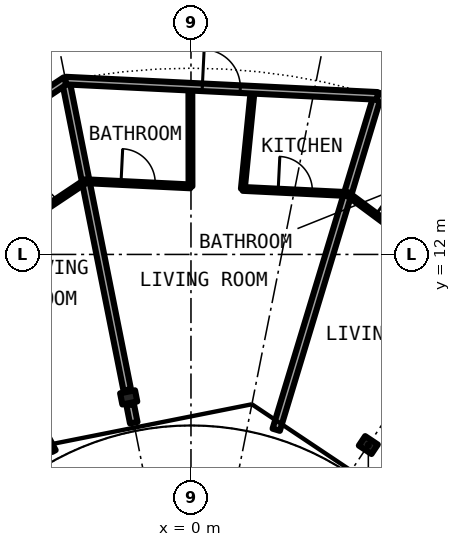
"""IFC4 building model, lengths in metres.
Left out: names, types, materials, properties, quantities, classifications, styles, units other than length and angle.
Written with IfcOpenShell. Run it as: python <this file> out.ifc"""

import sys

from ifc_helpers import new_model, si_unit, direction, frame, frame_2d, origin, origin_2d, place, context, subcontext, project, spatial, rectangle, i_section, extrude, element, fill, save


model = new_model("IFC4")
c1 = context("Model", 3, precision=1e-05, world=origin(), true_north=direction((0.0, 1.0)))
c2 = subcontext(c1, "Body", "Model", "MODEL_VIEW")
j1 = project(units=[si_unit("LENGTHUNIT", "METRE"), si_unit("PLANEANGLEUNIT", "RADIAN")], contexts=[c1])
p1 = place(None, origin())
s1 = spatial("IfcSite", under=j1, at=p1, CompositionType="ELEMENT")
p2 = place(p1, origin())
s2 = spatial("IfcBuilding", under=s1, at=p2, CompositionType="ELEMENT")
p3 = place(p2, frame((0.0, 0.0, 91.05)))
s3 = spatial("IfcBuildingStorey", under=s2, at=p3, CompositionType="ELEMENT", Elevation=91.05)
for number, where, z_axis, x_axis in (
    (1, (4.667, 6.984, 0.0), (0.0, 0.0, 1.0), (0.556, 0.831, 0.0)),
    (2, (-1.639, 8.239, 0.0), (0.0, 0.0, 1.0), (-0.195, 0.981, 0.0)),
):
    element("IfcColumn", number, at=place(p3, frame(where, z_axis=z_axis, x_axis=x_axis)), inside=s3, PredefinedType="COLUMN", context=c2, shape_type="SweptSolid", body=[
        extrude(i_section(OverallWidth=0.3, OverallDepth=0.4, WebThickness=0.013, FlangeThickness=0.024, FilletRadius=0.027, at=origin_2d()), origin(), (0.0, 0.0, 1.0), 3.05),
    ])
p4 = place(p3, frame((-6.159, 11.663, 0.0), z_axis=(0.0, 0.0, 1.0), x_axis=(0.466976820365, -0.884269556889, 0.0)))
e3 = element("IfcWall", 3, at=p4, inside=s3, PredefinedType="PARTITIONING", context=c2, shape_type="SweptSolid", body=[
    extrude(rectangle(XDim=5.469, YDim=0.1, at=frame_2d((2.735, 0.0))), origin(), (0.0, 0.0, 1.0), 2.7),
])
p5 = place(p4, frame((2.284, 0.0, 0.0)))
e4 = element("IfcOpeningElement", 4, at=p5, cuts=e3, PredefinedType="OPENING", context=c2, shape_type="SweptSolid", body=[
    extrude(rectangle(XDim=0.9, YDim=2.3, at=frame_2d((0.45, 1.15))), frame((0.0, 0.06, 0.0), z_axis=(0.0, -1.0, 0.0), x_axis=(1.0, 0.0, 0.0)), (0.0, 0.0, 1.0), 0.12),
])
p6 = place(p3, frame((-3.297, 16.575, 0.0), z_axis=(0.0, 0.0, 1.0), x_axis=(0.195205282633, -0.980762406311, 0.0)))
e5 = element("IfcWall", 5, at=p6, inside=s3, PredefinedType="PARTITIONING", context=c2, shape_type="SweptSolid", body=[
    extrude(rectangle(XDim=8.3, YDim=0.2, at=frame_2d((4.15, 0.0))), origin(), (0.0, 0.0, 1.0), 2.7),
])
p7 = place(p3, frame((-1.599, 8.043, 0.0), z_axis=(0.0, 0.0, 1.0), x_axis=(0.193768289311, -0.981047323047, 0.0)))
e6 = element("IfcWall", 6, at=p7, inside=s3, PredefinedType="PARTITIONING", context=c2, shape_type="SweptSolid", body=[
    extrude(rectangle(XDim=0.48, YDim=0.2, at=frame_2d((0.24, 0.0))), origin(), (0.0, 0.0, 1.0), 2.7),
])
p8 = place(p3, frame((-0.013, 13.792, 0.0), z_axis=(0.0, 0.0, 1.0), x_axis=(-0.001210427419, 0.999999267432, 0.0)))
e7 = element("IfcWall", 7, at=p8, inside=s3, PredefinedType="PARTITIONING", context=c2, shape_type="SweptSolid", body=[
    extrude(rectangle(XDim=2.622, YDim=0.1, at=frame_2d((1.311, 0.0))), origin(), (0.0, 0.0, 1.0), 2.7),
])
p9 = place(p3, frame((1.365, 13.724, 0.0), z_axis=(0.0, 0.0, 1.0), x_axis=(0.099171803948, 0.995070325807, 0.0)))
e8 = element("IfcWall", 8, at=p9, inside=s3, PredefinedType="PARTITIONING", context=c2, shape_type="SweptSolid", body=[
    extrude(rectangle(XDim=2.622, YDim=0.1, at=frame_2d((1.311, 0.0))), origin(), (0.0, 0.0, 1.0), 2.7),
])
p10 = place(p3, frame((2.243, 7.387, 0.0), z_axis=(0.0, 0.0, 1.0), x_axis=(0.290196345171, 0.956967126525, 0.0)))
e9 = element("IfcWall", 9, at=p10, inside=s3, PredefinedType="PARTITIONING", context=c2, shape_type="SweptSolid", body=[
    extrude(rectangle(XDim=9.18, YDim=0.2, at=frame_2d((4.59, 0.0))), origin(), (0.0, 0.0, 1.0), 2.7),
])
p11 = place(p3, frame((4.909, 5.958, 0.0), z_axis=(0.0, 0.0, 1.0), x_axis=(0.635976043025, 0.771708800454, 0.0)))
e10 = element("IfcWall", 10, at=p11, inside=s3, PredefinedType="PARTITIONING", context=c2, shape_type="SweptSolid", body=[
    extrude(rectangle(XDim=8.213, YDim=0.1, at=frame_2d((4.106, 0.0))), origin(), (0.0, 0.0, 1.0), 2.7),
])
p12 = place(p11, frame((6.49, 0.0, 0.0)))
e11 = element("IfcOpeningElement", 11, at=p12, cuts=e10, PredefinedType="OPENING", context=c2, shape_type="SweptSolid", body=[
    extrude(rectangle(XDim=0.9, YDim=2.3, at=frame_2d((0.45, 1.15))), frame((0.0, 0.06, 0.0), z_axis=(0.0, -1.0, 0.0), x_axis=(1.0, 0.0, 0.0)), (0.0, 0.0, 1.0), 0.12),
])
p13 = place(p11, frame((2.384, 0.0, 0.0)))
e12 = element("IfcOpeningElement", 12, at=p13, cuts=e10, PredefinedType="OPENING", context=c2, shape_type="SweptSolid", body=[
    extrude(rectangle(XDim=0.9, YDim=2.3, at=frame_2d((0.45, 1.15))), frame((0.0, 0.06, 0.0), z_axis=(0.0, -1.0, 0.0), x_axis=(1.0, 0.0, 0.0)), (0.0, 0.0, 1.0), 0.12),
])
p14 = place(p3, frame((-5.032, 12.417, 0.0), z_axis=(0.0, 0.0, 1.0), x_axis=(0.831538390496, 0.555467285384, 0.0)))
e13 = element("IfcWall", 13, at=p14, inside=s3, PredefinedType="PARTITIONING", context=c2, shape_type="SweptSolid", body=[
    extrude(rectangle(XDim=2.717, YDim=0.1, at=frame_2d((1.358, 0.0))), origin(), (0.0, 0.0, 1.0), 2.7),
])
p15 = place(p14, frame((0.911, 0.0, 0.0)))
e14 = element("IfcOpeningElement", 14, at=p15, cuts=e13, PredefinedType="OPENING", context=c2, shape_type="SweptSolid", body=[
    extrude(rectangle(XDim=0.9, YDim=2.3, at=frame_2d((0.45, 1.15))), frame((0.0, 0.06, 0.0), z_axis=(0.0, -1.0, 0.0), x_axis=(1.0, 0.0, 0.0)), (0.0, 0.0, 1.0), 0.12),
])
p16 = place(p3, frame((4.122, 13.589, 0.0), z_axis=(0.0, 0.0, 1.0), x_axis=(0.803128348509, -0.595806055542, 0.0)))
e15 = element("IfcWall", 15, at=p16, inside=s3, PredefinedType="PARTITIONING", context=c2, shape_type="SweptSolid", body=[
    extrude(rectangle(XDim=2.734, YDim=0.1, at=frame_2d((1.367, 0.0))), origin(), (0.0, 0.0, 1.0), 2.7),
])
p17 = place(p16, frame((0.917, 0.0, 0.0)))
e16 = element("IfcOpeningElement", 16, at=p17, cuts=e15, PredefinedType="OPENING", context=c2, shape_type="SweptSolid", body=[
    extrude(rectangle(XDim=0.9, YDim=2.3, at=frame_2d((0.45, 1.15))), frame((0.0, 0.06, 0.0), z_axis=(0.0, -1.0, 0.0), x_axis=(1.0, 0.0, 0.0)), (0.0, 0.0, 1.0), 0.12),
])
p18 = place(p3, frame((-2.77, 13.926, 0.0), z_axis=(0.0, 0.0, 1.0), x_axis=(0.99880320044, -0.048909782152, 0.0)))
e17 = element("IfcWall", 17, at=p18, inside=s3, PredefinedType="PARTITIONING", context=c2, shape_type="SweptSolid", body=[
    extrude(rectangle(XDim=2.76, YDim=0.1, at=frame_2d((1.38, 0.0))), origin(), (0.0, 0.0, 1.0), 2.7),
])
p19 = place(p18, frame((0.93, 0.0, 0.0)))
e18 = element("IfcOpeningElement", 18, at=p19, cuts=e17, PredefinedType="OPENING", context=c2, shape_type="SweptSolid", body=[
    extrude(rectangle(XDim=0.9, YDim=2.3, at=frame_2d((0.45, 1.15))), frame((0.0, 0.06, 0.0), z_axis=(0.0, -1.0, 0.0), x_axis=(1.0, 0.0, 0.0)), (0.0, 0.0, 1.0), 0.12),
])
p20 = place(p3, frame((1.365, 13.724, 0.0), z_axis=(0.0, 0.0, 1.0), x_axis=(0.99880320044, -0.048909782152, 0.0)))
e19 = element("IfcWall", 19, at=p20, inside=s3, PredefinedType="PARTITIONING", context=c2, shape_type="SweptSolid", body=[
    extrude(rectangle(XDim=2.76, YDim=0.1, at=frame_2d((1.38, 0.0))), origin(), (0.0, 0.0, 1.0), 2.7),
])
p21 = place(p20, frame((0.93, 0.0, 0.0)))
e20 = element("IfcOpeningElement", 20, at=p21, cuts=e19, PredefinedType="OPENING", context=c2, shape_type="SweptSolid", body=[
    extrude(rectangle(XDim=0.9, YDim=2.3, at=frame_2d((0.45, 1.15))), frame((0.0, 0.06, 0.0), z_axis=(0.0, -1.0, 0.0), x_axis=(1.0, 0.0, 0.0)), (0.0, 0.0, 1.0), 0.12),
])
p22 = place(p3, frame((-12.708, 10.286, 0.0), z_axis=(0.0, 0.0, 1.0), x_axis=(0.831405725802, 0.555665834026, 0.0)))
e21 = element("IfcWall", 21, at=p22, inside=s3, PredefinedType="PARTITIONING", context=c2, shape_type="SweptSolid", body=[
    extrude(rectangle(XDim=11.314, YDim=0.2, at=frame_2d((5.657, 0.0))), origin(), (0.0, 0.0, 1.0), 2.7),
])
p23 = place(p22, frame((5.969, 0.0, 0.0)))
e22 = element("IfcOpeningElement", 22, at=p23, cuts=e21, PredefinedType="OPENING", context=c2, shape_type="SweptSolid", body=[
    extrude(rectangle(XDim=1.0, YDim=2.3, at=frame_2d((0.5, 1.15))), frame((0.0, 0.11, 0.0), z_axis=(0.0, -1.0, 0.0), x_axis=(1.0, 0.0, 0.0)), (0.0, 0.0, 1.0), 0.22),
])
p24 = place(p3, frame((4.906, 16.172, 0.0), z_axis=(0.0, 0.0, 1.0), x_axis=(0.803191461888, -0.595720971219, 0.0)))
e23 = element("IfcWall", 23, at=p24, inside=s3, PredefinedType="PARTITIONING", context=c2, shape_type="SweptSolid", body=[
    extrude(rectangle(XDim=9.76, YDim=0.2, at=frame_2d((4.88, 0.0))), origin(), (0.0, 0.0, 1.0), 2.7),
])
p25 = place(p24, frame((4.38, 0.0, 0.0)))
e24 = element("IfcOpeningElement", 24, at=p25, cuts=e23, PredefinedType="OPENING", context=c2, shape_type="SweptSolid", body=[
    extrude(rectangle(XDim=1.0, YDim=2.3, at=frame_2d((0.5, 1.15))), frame((0.0, 0.11, 0.0), z_axis=(0.0, -1.0, 0.0), x_axis=(1.0, 0.0, 0.0)), (0.0, 0.0, 1.0), 0.22),
])
p26 = place(p3, frame((-3.298, 16.574, 0.0), z_axis=(0.0, 0.0, 1.0), x_axis=(0.998802523271, -0.048923608895, 0.0)))
e25 = element("IfcWall", 25, at=p26, inside=s3, PredefinedType="PARTITIONING", context=c2, shape_type="SweptSolid", body=[
    extrude(rectangle(XDim=8.214, YDim=0.2, at=frame_2d((4.107, 0.0))), origin(), (0.0, 0.0, 1.0), 2.7),
])
p27 = place(p26, frame((3.6, 0.0, 0.0)))
e26 = element("IfcOpeningElement", 26, at=p27, cuts=e25, PredefinedType="OPENING", context=c2, shape_type="SweptSolid", body=[
    extrude(rectangle(XDim=1.0, YDim=2.3, at=frame_2d((0.5, 1.15))), frame((0.0, 0.11, 0.0), z_axis=(0.0, -1.0, 0.0), x_axis=(1.0, 0.0, 0.0)), (0.0, 0.0, 1.0), 0.22),
])
p28 = place(p3, frame((-0.007, 19.599, 0.0), z_axis=(0.0, 0.0, 1.0), x_axis=(0.95700958731, -0.290056287291, 0.0)))
e27 = element("IfcWall", 27, at=p28, inside=s3, PredefinedType="PARTITIONING", context=c2, shape_type="SweptSolid", body=[
    extrude(rectangle(XDim=11.226, YDim=0.2, at=frame_2d((5.613, 0.0))), origin(), (0.0, 0.0, 1.0), 2.38),
])
p29 = place(p28, frame((7.093, 0.0, 0.0)))
e28 = element("IfcOpeningElement", 28, at=p29, cuts=e27, PredefinedType="OPENING", context=c2, shape_type="SweptSolid", body=[
    extrude(rectangle(XDim=1.0, YDim=2.3, at=frame_2d((0.5, 1.15))), frame((0.0, 0.11, 0.0), z_axis=(0.0, -1.0, 0.0), x_axis=(1.0, 0.0, 0.0)), (0.0, 0.0, 1.0), 0.22),
])
p30 = place(p17, origin())
e29 = element("IfcDoor", 29, at=p30, inside=s3, OperationType="SINGLE_SWING_LEFT", PredefinedType="DOOR", context=c2, shape_type="SweptSolid", body=[
    extrude(rectangle(XDim=0.9, YDim=2.3, at=frame_2d((0.45, 1.15))), frame((0.0, 0.025, 0.0), z_axis=(0.0, -1.0, 0.0), x_axis=(1.0, 0.0, 0.0)), (0.0, 0.0, 1.0), 0.05),
])
fill(e16, e29)
p31 = place(p27, origin())
e30 = element("IfcDoor", 30, at=p31, inside=s3, OperationType="SINGLE_SWING_LEFT", PredefinedType="DOOR", context=c2, shape_type="SweptSolid", body=[
    extrude(rectangle(XDim=1.0, YDim=2.3, at=frame_2d((0.5, 1.15))), frame((0.0, 0.025, 0.0), z_axis=(0.0, -1.0, 0.0), x_axis=(1.0, 0.0, 0.0)), (0.0, 0.0, 1.0), 0.05),
])
fill(e26, e30)
p32 = place(p19, origin())
e31 = element("IfcDoor", 31, at=p32, inside=s3, OperationType="SINGLE_SWING_LEFT", PredefinedType="DOOR", context=c2, shape_type="SweptSolid", body=[
    extrude(rectangle(XDim=0.9, YDim=2.3, at=frame_2d((0.45, 1.15))), frame((0.0, 0.025, 0.0), z_axis=(0.0, -1.0, 0.0), x_axis=(1.0, 0.0, 0.0)), (0.0, 0.0, 1.0), 0.05),
])
fill(e18, e31)
p33 = place(p21, origin())
e32 = element("IfcDoor", 32, at=p33, inside=s3, OperationType="SINGLE_SWING_RIGHT", PredefinedType="DOOR", context=c2, shape_type="SweptSolid", body=[
    extrude(rectangle(XDim=0.9, YDim=2.3, at=frame_2d((0.45, 1.15))), frame((0.0, 0.025, 0.0), z_axis=(0.0, -1.0, 0.0), x_axis=(1.0, 0.0, 0.0)), (0.0, 0.0, 1.0), 0.05),
])
fill(e20, e32)
p34 = place(p15, origin())
e33 = element("IfcDoor", 33, at=p34, inside=s3, OperationType="SINGLE_SWING_RIGHT", PredefinedType="DOOR", context=c2, shape_type="SweptSolid", body=[
    extrude(rectangle(XDim=0.9, YDim=2.3, at=frame_2d((0.45, 1.15))), frame((0.0, 0.025, 0.0), z_axis=(0.0, -1.0, 0.0), x_axis=(1.0, 0.0, 0.0)), (0.0, 0.0, 1.0), 0.05),
])
fill(e14, e33)
save(model, sys.argv[1])
